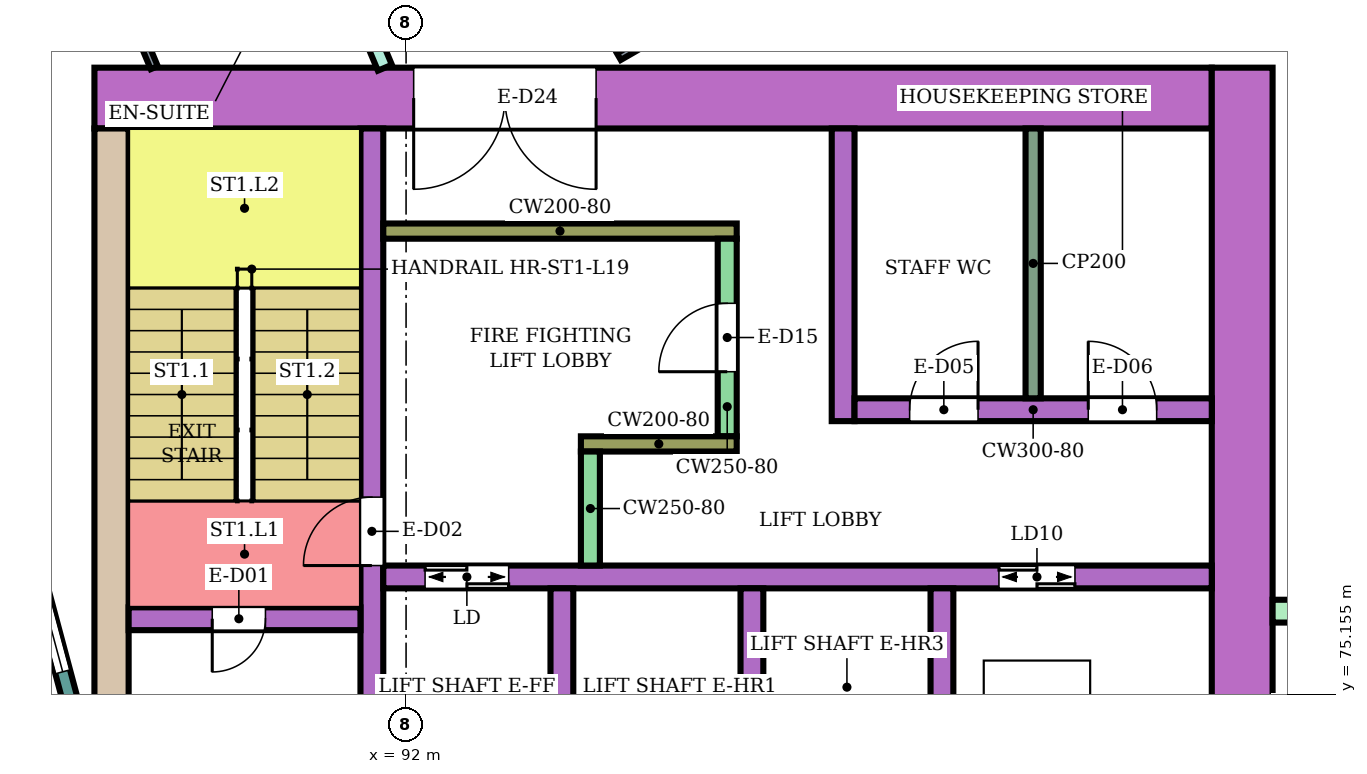
"""IFC4 building model, lengths in metres.
Left out: names, types, materials, properties, quantities, classifications, styles, units other than length and angle.
Written with IfcOpenShell. Run it as: python <this file> out.ifc"""

import sys

from ifc_helpers import new_model, si_unit, direction, frame, frame_2d, origin, place, context, subcontext, project, spatial, rectangle, extrude, element, fill, save


model = new_model("IFC4")
c1 = context("Model", 3, precision=1e-05, world=origin(), true_north=direction((0.0, 1.0)))
c2 = subcontext(c1, "Body", "Model", "MODEL_VIEW")
j1 = project(units=[si_unit("LENGTHUNIT", "METRE"), si_unit("PLANEANGLEUNIT", "RADIAN")], contexts=[c1])
p1 = place(None, origin())
s1 = spatial("IfcSite", under=j1, at=p1, CompositionType="ELEMENT")
p2 = place(p1, origin())
s2 = spatial("IfcBuilding", under=s1, at=p2, CompositionType="ELEMENT")
p3 = place(p2, frame((0.0, 0.0, 86.2)))
s3 = spatial("IfcBuildingStorey", under=s2, at=p3, CompositionType="ELEMENT", Elevation=86.2)
p4 = place(p3, frame((87.9, 83.0, 0.0), z_axis=(0.0, 0.0, 1.0), x_axis=(1.0, 0.0, 0.0)))
e1 = element("IfcWall", 1, at=p4, inside=s3, PredefinedType="SHEAR", context=c2, shape_type="SweptSolid", body=[
    extrude(rectangle(XDim=14.7, YDim=0.8, at=frame_2d((7.35, 0.0))), origin(), (0.0, 0.0, 1.0), 3.48),
])
p5 = place(p4, frame((4.2, 0.0, 0.0)))
e2 = element("IfcOpeningElement", 2, at=p5, cuts=e1, PredefinedType="OPENING", context=c2, shape_type="SweptSolid", body=[
    extrude(rectangle(XDim=2.4, YDim=2.4, at=frame_2d((1.2, 1.2))), frame((0.0, 0.41, 0.0), z_axis=(0.0, -1.0, 0.0), x_axis=(1.0, 0.0, 0.0)), (0.0, 0.0, 1.0), 0.82),
])
p6 = place(p3, frame((88.125, 75.0, 0.0), z_axis=(0.0, 0.0, 1.0), x_axis=(0.0, 1.0, 0.0)))
e3 = element("IfcWall", 3, at=p6, inside=s3, PredefinedType="SHEAR", context=c2, shape_type="SweptSolid", body=[
    extrude(rectangle(XDim=7.6, YDim=0.45, at=frame_2d((3.8, 0.0))), origin(), (0.0, 0.0, 1.0), 3.48),
])
p7 = place(p3, frame((103.0, 66.6, 0.0), z_axis=(0.0, 0.0, 1.0), x_axis=(0.0, 1.0, 0.0)))
e4 = element("IfcWall", 4, at=p7, inside=s3, PredefinedType="SHEAR", context=c2, shape_type="SweptSolid", body=[
    extrude(rectangle(XDim=16.8, YDim=0.8, at=frame_2d((8.4, 0.0))), origin(), (0.0, 0.0, 1.0), 3.48),
])
p8 = place(p3, frame((91.55, 75.0, 0.0), z_axis=(0.0, 0.0, 1.0), x_axis=(0.0, 1.0, 0.0)))
e5 = element("IfcWall", 5, at=p8, inside=s3, PredefinedType="SHEAR", context=c2, shape_type="SweptSolid", body=[
    extrude(rectangle(XDim=7.6, YDim=0.3, at=frame_2d((3.8, 0.0))), origin(), (0.0, 0.0, 1.0), 3.48),
])
p9 = place(p8, frame((1.85, 0.0, 0.0)))
e6 = element("IfcOpeningElement", 6, at=p9, cuts=e5, PredefinedType="OPENING", context=c2, shape_type="SweptSolid", body=[
    extrude(rectangle(XDim=0.9, YDim=2.1, at=frame_2d((0.45, 1.05))), frame((0.0, 0.16, 0.0), z_axis=(0.0, -1.0, 0.0), x_axis=(1.0, 0.0, 0.0)), (0.0, 0.0, 1.0), 0.32),
])
p10 = place(p3, frame((88.35, 76.15, 0.0), z_axis=(0.0, 0.0, 1.0), x_axis=(1.0, 0.0, 0.0)))
e7 = element("IfcWall", 7, at=p10, inside=s3, PredefinedType="SHEAR", context=c2, shape_type="SweptSolid", body=[
    extrude(rectangle(XDim=3.05, YDim=0.3, at=frame_2d((1.525, 0.0))), origin(), (0.0, 0.0, 1.0), 3.48),
])
p11 = place(p10, frame((1.1, 0.0, 0.0)))
e8 = element("IfcOpeningElement", 8, at=p11, cuts=e7, PredefinedType="OPENING", context=c2, shape_type="SweptSolid", body=[
    extrude(rectangle(XDim=0.7, YDim=2.0, at=frame_2d((0.35, 1.0))), frame((0.0, 0.16, 0.0), z_axis=(0.0, -1.0, 0.0), x_axis=(1.0, 0.0, 0.0)), (0.0, 0.0, 1.0), 0.32),
])
p12 = place(p3, frame((91.7, 76.7, 0.0), z_axis=(0.0, 0.0, 1.0), x_axis=(1.0, 0.0, 0.0)))
e9 = element("IfcWall", 9, at=p12, inside=s3, PredefinedType="SHEAR", context=c2, shape_type="SweptSolid", body=[
    extrude(rectangle(XDim=10.9, YDim=0.3, at=frame_2d((5.45, 0.0))), origin(), (0.0, 0.0, 1.0), 3.48),
])
p13 = place(p12, frame((0.55, 0.0, 0.0)))
e10 = element("IfcOpeningElement", 10, at=p13, cuts=e9, PredefinedType="OPENING", context=c2, shape_type="SweptSolid", body=[
    extrude(rectangle(XDim=1.1, YDim=2.1, at=frame_2d((0.55, 1.05))), frame((0.0, 0.16, 0.0), z_axis=(0.0, -1.0, 0.0), x_axis=(1.0, 0.0, 0.0)), (0.0, 0.0, 1.0), 0.32),
])
p14 = place(p12, frame((8.1, 0.0, 0.0)))
e11 = element("IfcOpeningElement", 11, at=p14, cuts=e9, PredefinedType="OPENING", context=c2, shape_type="SweptSolid", body=[
    extrude(rectangle(XDim=1.0, YDim=2.1, at=frame_2d((0.5, 1.05))), frame((0.0, 0.16, 0.0), z_axis=(0.0, -1.0, 0.0), x_axis=(1.0, 0.0, 0.0)), (0.0, 0.0, 1.0), 0.32),
])
for number, where, z_axis, x_axis in (
    (12, (94.05, 74.0, 0.0), (0.0, 0.0, 1.0), (0.0, 1.0, 0.0)),
    (13, (96.55, 74.0, 0.0), (0.0, 0.0, 1.0), (0.0, 1.0, 0.0)),
    (14, (99.05, 74.0, 0.0), (0.0, 0.0, 1.0), (0.0, 1.0, 0.0)),
):
    element("IfcWall", number, at=place(p3, frame(where, z_axis=z_axis, x_axis=x_axis)), inside=s3, PredefinedType="SHEAR", context=c2, shape_type="SweptSolid", body=[
        extrude(rectangle(XDim=2.55, YDim=0.3, at=frame_2d((1.275, 0.0))), origin(), (0.0, 0.0, 1.0), 3.48),
    ])
p15 = place(p3, frame((91.7, 81.25, 0.0), z_axis=(0.0, 0.0, 1.0), x_axis=(1.0, 0.0, 0.0)))
e15 = element("IfcWall", 15, at=p15, inside=s3, PredefinedType="SHEAR", context=c2, shape_type="SweptSolid", body=[
    extrude(rectangle(XDim=4.65, YDim=0.2, at=frame_2d((2.325, 0.0))), origin(), (0.0, 0.0, 1.0), 3.48),
])
p16 = place(p3, frame((96.225, 78.55, 0.0), z_axis=(0.0, 0.0, 1.0), x_axis=(0.0, 1.0, 0.0)))
e16 = element("IfcWall", 16, at=p16, inside=s3, PredefinedType="SHEAR", context=c2, shape_type="SweptSolid", body=[
    extrude(rectangle(XDim=2.6, YDim=0.25, at=frame_2d((1.3, 0.0))), origin(), (0.0, 0.0, 1.0), 3.48),
])
p17 = place(p16, frame((0.85, 0.0, 0.0)))
e17 = element("IfcOpeningElement", 17, at=p17, cuts=e16, PredefinedType="OPENING", context=c2, shape_type="SweptSolid", body=[
    extrude(rectangle(XDim=0.9, YDim=2.1, at=frame_2d((0.45, 1.05))), frame((0.0, 0.135, 0.0), z_axis=(0.0, -1.0, 0.0), x_axis=(1.0, 0.0, 0.0)), (0.0, 0.0, 1.0), 0.27),
])
p18 = place(p3, frame((94.3, 78.45, 0.0), z_axis=(0.0, 0.0, 1.0), x_axis=(1.0, 0.0, 0.0)))
e18 = element("IfcWall", 18, at=p18, inside=s3, PredefinedType="SHEAR", context=c2, shape_type="SweptSolid", body=[
    extrude(rectangle(XDim=2.05, YDim=0.2, at=frame_2d((1.025, 0.0))), origin(), (0.0, 0.0, 1.0), 3.48),
])
p19 = place(p3, frame((94.425, 76.85, 0.0), z_axis=(0.0, 0.0, 1.0), x_axis=(0.0, 1.0, 0.0)))
e19 = element("IfcWall", 19, at=p19, inside=s3, PredefinedType="SHEAR", context=c2, shape_type="SweptSolid", body=[
    extrude(rectangle(XDim=1.5, YDim=0.25, at=frame_2d((0.75, 0.0))), origin(), (0.0, 0.0, 1.0), 3.48),
])
p20 = place(p3, frame((97.75, 78.75, 0.0), z_axis=(0.0, 0.0, 1.0), x_axis=(0.0, 1.0, 0.0)))
e20 = element("IfcWall", 20, at=p20, inside=s3, PredefinedType="SHEAR", context=c2, shape_type="SweptSolid", body=[
    extrude(rectangle(XDim=3.85, YDim=0.3, at=frame_2d((1.925, 0.0))), origin(), (0.0, 0.0, 1.0), 3.48),
])
p21 = place(p3, frame((97.9, 78.9, 0.0), z_axis=(0.0, 0.0, 1.0), x_axis=(1.0, 0.0, 0.0)))
e21 = element("IfcWall", 21, at=p21, inside=s3, PredefinedType="SHEAR", context=c2, shape_type="SweptSolid", body=[
    extrude(rectangle(XDim=4.7, YDim=0.3, at=frame_2d((2.35, 0.0))), origin(), (0.0, 0.0, 1.0), 3.48),
])
p22 = place(p21, frame((0.725, 0.0, 0.0)))
e22 = element("IfcOpeningElement", 22, at=p22, cuts=e21, PredefinedType="OPENING", context=c2, shape_type="SweptSolid", body=[
    extrude(rectangle(XDim=0.9, YDim=2.1, at=frame_2d((0.45, 1.05))), frame((0.0, 0.16, 0.0), z_axis=(0.0, -1.0, 0.0), x_axis=(1.0, 0.0, 0.0)), (0.0, 0.0, 1.0), 0.32),
])
p23 = place(p21, frame((3.075, 0.0, 0.0)))
e23 = element("IfcOpeningElement", 23, at=p23, cuts=e21, PredefinedType="OPENING", context=c2, shape_type="SweptSolid", body=[
    extrude(rectangle(XDim=0.9, YDim=2.1, at=frame_2d((0.45, 1.05))), frame((0.0, 0.16, 0.0), z_axis=(0.0, -1.0, 0.0), x_axis=(1.0, 0.0, 0.0)), (0.0, 0.0, 1.0), 0.32),
])
p24 = place(p3, frame((103.4, 76.25, 0.0), z_axis=(0.0, 0.0, 1.0), x_axis=(1.0, 0.0, 0.0)))
e24 = element("IfcWall", 24, at=p24, inside=s3, PredefinedType="NOTDEFINED", context=c2, shape_type="SweptSolid", body=[
    extrude(rectangle(XDim=2.416, YDim=0.3, at=frame_2d((1.208, 0.0))), origin(), (0.0, 0.0, 1.0), 3.8),
])
p25 = place(p3, frame((87.604, 75.0, 0.0), z_axis=(0.0, 0.0, 1.0), x_axis=(-0.258789828301, 0.965933654434, 0.0)))
e25 = element("IfcWall", 25, at=p25, inside=s3, PredefinedType="NOTDEFINED", context=c2, shape_type="SweptSolid", body=[
    extrude(rectangle(XDim=3.936, YDim=0.2, at=frame_2d((1.968, 0.0))), origin(), (0.0, 0.0, 1.0), 3.8),
])
p26 = place(p25, frame((0.468, 0.0, 0.9)))
e26 = element("IfcOpeningElement", 26, at=p26, cuts=e25, PredefinedType="OPENING", context=c2, shape_type="SweptSolid", body=[
    extrude(rectangle(XDim=3.0, YDim=2.3, at=frame_2d((1.5, 1.15))), frame((0.0, 0.11, 0.0), z_axis=(0.0, -1.0, 0.0), x_axis=(1.0, 0.0, 0.0)), (0.0, 0.0, 1.0), 0.22),
])
p27 = place(p3, frame((83.85, 81.667, 0.0), z_axis=(0.0, 0.0, 1.0), x_axis=(0.500222212082, 0.865897071562, 0.0)))
e27 = element("IfcWall", 27, at=p27, inside=s3, PredefinedType="PARTITIONING", context=c2, shape_type="SweptSolid", body=[
    extrude(rectangle(XDim=9.768, YDim=0.2, at=frame_2d((4.884, 0.0))), origin(), (0.0, 0.0, 1.0), 3.35),
])
p28 = place(p3, frame((88.698, 90.624, 0.0), z_axis=(0.0, 0.0, 1.0), x_axis=(0.386027055918, -0.922487459047, 0.0)))
e28 = element("IfcWall", 28, at=p28, inside=s3, PredefinedType="PARTITIONING", context=c2, shape_type="SweptSolid", body=[
    extrude(rectangle(XDim=7.832, YDim=0.2, at=frame_2d((3.916, 0.0))), origin(), (0.0, 0.0, 1.0), 3.35),
])
p29 = place(p28, frame((1.482, 0.0, 0.0)))
e29 = element("IfcOpeningElement", 29, at=p29, cuts=e28, PredefinedType="OPENING", context=c2, shape_type="SweptSolid", body=[
    extrude(rectangle(XDim=1.0, YDim=2.1, at=frame_2d((0.5, 1.05))), frame((0.0, 0.11, 0.0), z_axis=(0.0, -1.0, 0.0), x_axis=(1.0, 0.0, 0.0)), (0.0, 0.0, 1.0), 0.22),
])
p30 = place(p3, frame((88.348, 84.209, 0.0), z_axis=(0.0, 0.0, 1.0), x_axis=(0.386077497504, -0.922466349479, 0.0)))
e30 = element("IfcWall", 30, at=p30, inside=s3, PredefinedType="PARTITIONING", context=c2, shape_type="SweptSolid", body=[
    extrude(rectangle(XDim=0.877, YDim=0.1, at=frame_2d((0.438, 0.0))), origin(), (0.0, 0.0, 1.0), 3.35),
])
p31 = place(p3, frame((94.8, 83.545, 0.0), z_axis=(0.0, 0.0, 1.0), x_axis=(0.86602264145, 0.500004784474, 0.0)))
e31 = element("IfcWall", 31, at=p31, inside=s3, PredefinedType="PARTITIONING", context=c2, shape_type="SweptSolid", body=[
    extrude(rectangle(XDim=8.708, YDim=0.1, at=frame_2d((4.354, 0.0))), origin(), (0.0, 0.0, 1.0), 3.35),
])
p32 = place(p31, frame((3.879, 0.0, 0.0)))
e32 = element("IfcOpeningElement", 32, at=p32, cuts=e31, PredefinedType="OPENING", context=c2, shape_type="SweptSolid", body=[
    extrude(rectangle(XDim=0.9, YDim=2.1, at=frame_2d((0.45, 1.05))), frame((0.0, 0.06, 0.0), z_axis=(0.0, -1.0, 0.0), x_axis=(1.0, 0.0, 0.0)), (0.0, 0.0, 1.0), 0.12),
])
p33 = place(p3, frame((100.25, 79.05, 0.0), z_axis=(0.0, 0.0, 1.0), x_axis=(0.0, 1.0, 0.0)))
e33 = element("IfcWall", 33, at=p33, inside=s3, PredefinedType="PARTITIONING", context=c2, shape_type="SweptSolid", body=[
    extrude(rectangle(XDim=3.55, YDim=0.2, at=frame_2d((1.775, 0.0))), origin(), (0.0, 0.0, 1.0), 3.48),
])
p34 = place(p26, origin())
e34 = element("IfcWindow", 34, at=p34, inside=s3, PartitioningType="SINGLE_PANEL", PredefinedType="WINDOW", context=c2, shape_type="SweptSolid", body=[
    extrude(rectangle(XDim=3.0, YDim=2.3, at=frame_2d((1.5, 1.15))), frame((0.0, 0.03, 0.0), z_axis=(0.0, -1.0, 0.0), x_axis=(1.0, 0.0, 0.0)), (0.0, 0.0, 1.0), 0.06),
])
fill(e26, e34)
p35 = place(p11, frame((0.7, 0.0, 0.0), z_axis=(0.0, 0.0, 1.0), x_axis=(-1.0, 0.0, 0.0)))
e35 = element("IfcDoor", 35, at=p35, inside=s3, OperationType="SINGLE_SWING_RIGHT", PredefinedType="DOOR", context=c2, shape_type="SweptSolid", body=[
    extrude(rectangle(XDim=0.7, YDim=2.0, at=frame_2d((0.35, 1.0))), frame((0.0, 0.025, 0.0), z_axis=(0.0, -1.0, 0.0), x_axis=(1.0, 0.0, 0.0)), (0.0, 0.0, 1.0), 0.05),
])
fill(e8, e35)
p36 = place(p9, origin())
e36 = element("IfcDoor", 36, at=p36, inside=s3, OperationType="SINGLE_SWING_LEFT", PredefinedType="DOOR", context=c2, shape_type="SweptSolid", body=[
    extrude(rectangle(XDim=0.9, YDim=2.1, at=frame_2d((0.45, 1.05))), frame((0.0, 0.025, 0.0), z_axis=(0.0, -1.0, 0.0), x_axis=(1.0, 0.0, 0.0)), (0.0, 0.0, 1.0), 0.05),
])
fill(e6, e36)
p37 = place(p13, origin())
e37 = element("IfcDoor", 37, at=p37, inside=s3, OperationType="DOUBLE_DOOR_SLIDING", PredefinedType="DOOR", context=c2, shape_type="SweptSolid", body=[
    extrude(rectangle(XDim=1.1, YDim=2.1, at=frame_2d((0.55, 1.05))), frame((0.0, 0.025, 0.0), z_axis=(0.0, -1.0, 0.0), x_axis=(1.0, 0.0, 0.0)), (0.0, 0.0, 1.0), 0.05),
])
fill(e10, e37)
p38 = place(p14, origin())
e38 = element("IfcDoor", 38, at=p38, inside=s3, OperationType="DOUBLE_DOOR_SLIDING", PredefinedType="DOOR", context=c2, shape_type="SweptSolid", body=[
    extrude(rectangle(XDim=1.0, YDim=2.1, at=frame_2d((0.5, 1.05))), frame((0.0, 0.025, 0.0), z_axis=(0.0, -1.0, 0.0), x_axis=(1.0, 0.0, 0.0)), (0.0, 0.0, 1.0), 0.05),
])
fill(e11, e38)
p39 = place(p17, origin())
e39 = element("IfcDoor", 39, at=p39, inside=s3, OperationType="SINGLE_SWING_LEFT", PredefinedType="DOOR", context=c2, shape_type="SweptSolid", body=[
    extrude(rectangle(XDim=0.9, YDim=2.1, at=frame_2d((0.45, 1.05))), frame((0.0, 0.025, 0.0), z_axis=(0.0, -1.0, 0.0), x_axis=(1.0, 0.0, 0.0)), (0.0, 0.0, 1.0), 0.05),
])
fill(e17, e39)
p40 = place(p22, origin())
e40 = element("IfcDoor", 40, at=p40, inside=s3, OperationType="SINGLE_SWING_RIGHT", PredefinedType="DOOR", context=c2, shape_type="SweptSolid", body=[
    extrude(rectangle(XDim=0.9, YDim=2.1, at=frame_2d((0.45, 1.05))), frame((0.0, 0.025, 0.0), z_axis=(0.0, -1.0, 0.0), x_axis=(1.0, 0.0, 0.0)), (0.0, 0.0, 1.0), 0.05),
])
fill(e22, e40)
p41 = place(p23, origin())
e41 = element("IfcDoor", 41, at=p41, inside=s3, OperationType="SINGLE_SWING_LEFT", PredefinedType="DOOR", context=c2, shape_type="SweptSolid", body=[
    extrude(rectangle(XDim=0.9, YDim=2.1, at=frame_2d((0.45, 1.05))), frame((0.0, 0.025, 0.0), z_axis=(0.0, -1.0, 0.0), x_axis=(1.0, 0.0, 0.0)), (0.0, 0.0, 1.0), 0.05),
])
fill(e23, e41)
p42 = place(p5, frame((2.4, 0.0, 0.0), z_axis=(0.0, 0.0, 1.0), x_axis=(-1.0, 0.0, 0.0)))
e42 = element("IfcDoor", 42, at=p42, inside=s3, OperationType="DOUBLE_DOOR_SINGLE_SWING", PredefinedType="DOOR", context=c2, shape_type="SweptSolid", body=[
    extrude(rectangle(XDim=2.4, YDim=2.4, at=frame_2d((1.2, 1.2))), frame((0.0, 0.025, 0.0), z_axis=(0.0, -1.0, 0.0), x_axis=(1.0, 0.0, 0.0)), (0.0, 0.0, 1.0), 0.05),
])
fill(e2, e42)
save(model, sys.argv[1])
